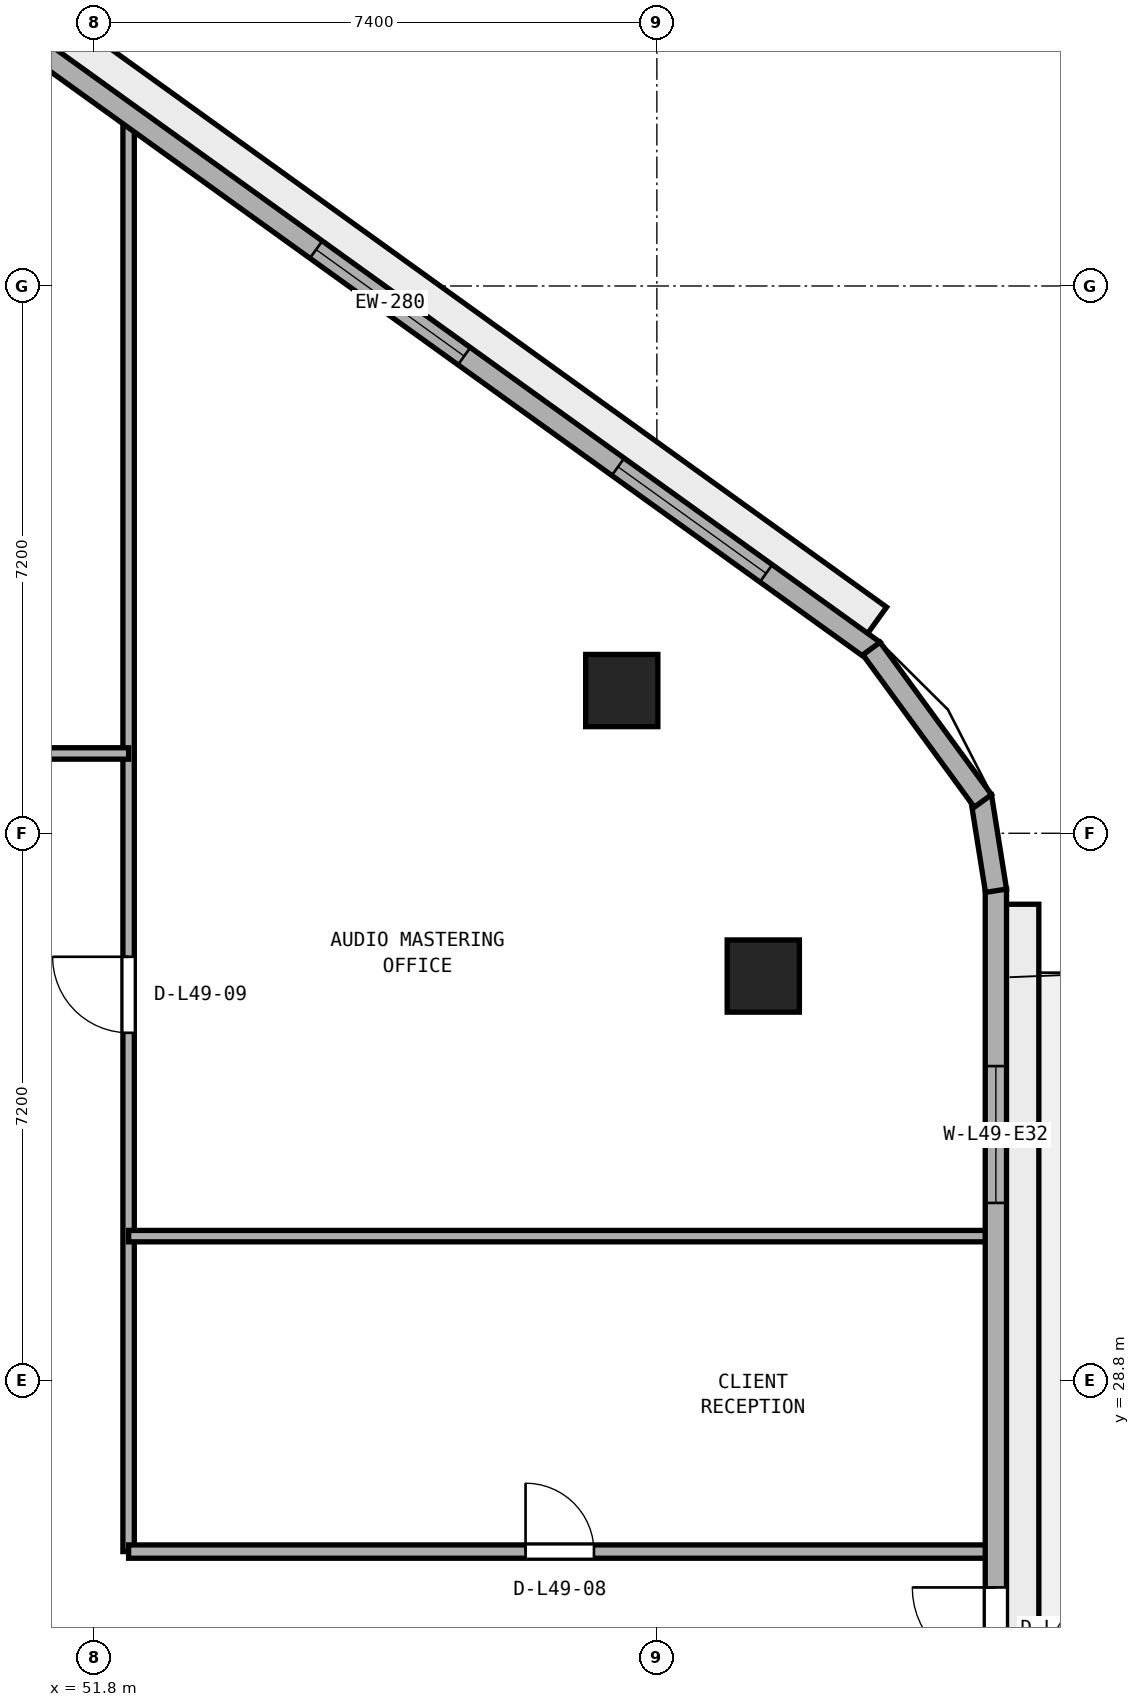
"""IFC4 building model, lengths in metres.
Left out: names, types, materials, properties, quantities, classifications, styles, units other than length and angle.
Written with IfcOpenShell. Run it as: python <this file> out.ifc"""

import sys

from ifc_helpers import new_model, si_unit, direction, frame, frame_2d, origin, origin_2d, place, context, subcontext, project, spatial, rectangle, extrude, element, fill, save


model = new_model("IFC4")
c1 = context("Model", 3, precision=1e-05, world=origin(), true_north=direction((0.0, 1.0)))
c2 = subcontext(c1, "Body", "Model", "MODEL_VIEW")
j1 = project(units=[si_unit("LENGTHUNIT", "METRE"), si_unit("PLANEANGLEUNIT", "RADIAN")], contexts=[c1])
p1 = place(None, origin())
s1 = spatial("IfcSite", under=j1, at=p1, CompositionType="ELEMENT")
p2 = place(p1, origin())
s2 = spatial("IfcBuilding", under=s1, at=p2, CompositionType="ELEMENT")
p3 = place(p2, frame((0.0, 0.0, 193.4)))
s3 = spatial("IfcBuildingStorey", under=s2, at=p3, CompositionType="ELEMENT", Elevation=193.4)
for number, where, z_axis, x_axis in (
    (1, (60.6, 34.122, 0.0), (0.0, 0.0, 1.0), (1.0, 0.0, 0.0)),
    (2, (58.738, 37.878, 0.0), (0.0, 0.0, 1.0), (1.0, 0.0, 0.0)),
):
    element("IfcColumn", number, at=place(p3, frame(where, z_axis=z_axis, x_axis=x_axis)), inside=s3, PredefinedType="COLUMN", context=c2, shape_type="SweptSolid", body=[
        extrude(rectangle(XDim=0.95, YDim=0.95, at=origin_2d()), origin(), (0.0, 0.0, 1.0), 3.8),
    ])
p4 = place(p3, frame((52.25, 26.55, 0.0), z_axis=(0.0, 0.0, 1.0), x_axis=(0.0, 1.0, 0.0)))
e3 = element("IfcWall", 3, at=p4, inside=s3, PredefinedType="PARTITIONING", context=c2, shape_type="SweptSolid", body=[
    extrude(rectangle(XDim=18.936, YDim=0.15, at=frame_2d((9.468, 0.0))), origin(), (0.0, 0.0, 1.0), 3.54),
])
p5 = place(p4, frame((6.825, 0.0, 0.0)))
e4 = element("IfcOpeningElement", 4, at=p5, cuts=e3, PredefinedType="OPENING", context=c2, shape_type="SweptSolid", body=[
    extrude(rectangle(XDim=1.0, YDim=2.12, at=frame_2d((0.5, 1.06))), frame((0.0, 0.085, 0.0), z_axis=(0.0, -1.0, 0.0), x_axis=(1.0, 0.0, 0.0)), (0.0, 0.0, 1.0), 0.17),
])
p6 = place(p3, frame((52.25, 26.55, 0.0), z_axis=(0.0, 0.0, 1.0), x_axis=(1.0, 0.0, 0.0)))
e5 = element("IfcWall", 5, at=p6, inside=s3, PredefinedType="PARTITIONING", context=c2, shape_type="SweptSolid", body=[
    extrude(rectangle(XDim=11.345, YDim=0.175, at=frame_2d((5.672, 0.0))), origin(), (0.0, 0.0, 1.0), 3.54),
])
p7 = place(p6, frame((5.222, 0.0, 0.0)))
e6 = element("IfcOpeningElement", 6, at=p7, cuts=e5, PredefinedType="OPENING", context=c2, shape_type="SweptSolid", body=[
    extrude(rectangle(XDim=0.9, YDim=2.1, at=frame_2d((0.45, 1.05))), frame((0.0, 0.097, 0.0), z_axis=(0.0, -1.0, 0.0), x_axis=(1.0, 0.0, 0.0)), (0.0, 0.0, 1.0), 0.195),
])
p8 = place(p3, frame((52.25, 30.7, 0.0), z_axis=(0.0, 0.0, 1.0), x_axis=(1.0, 0.0, 0.0)))
e7 = element("IfcWall", 7, at=p8, inside=s3, PredefinedType="PARTITIONING", context=c2, shape_type="SweptSolid", body=[
    extrude(rectangle(XDim=11.345, YDim=0.15, at=frame_2d((5.672, 0.0))), origin(), (0.0, 0.0, 1.0), 3.54),
])
p9 = place(p3, frame((21.75, 37.05, 0.0), z_axis=(0.0, 0.0, 1.0), x_axis=(1.0, 0.0, 0.0)))
e8 = element("IfcWall", 8, at=p9, inside=s3, PredefinedType="PARTITIONING", context=c2, shape_type="SweptSolid", body=[
    extrude(rectangle(XDim=30.5, YDim=0.15, at=frame_2d((15.25, 0.0))), origin(), (0.0, 0.0, 1.0), 3.54),
])
p10 = place(p9, frame((7.895, 0.0, 0.0)))
e9 = element("IfcOpeningElement", 9, at=p10, cuts=e8, PredefinedType="OPENING", context=c2, shape_type="SweptSolid", body=[
    extrude(rectangle(XDim=1.0, YDim=2.12, at=frame_2d((0.5, 1.06))), frame((0.0, 0.085, 0.0), z_axis=(0.0, -1.0, 0.0), x_axis=(1.0, 0.0, 0.0)), (0.0, 0.0, 1.0), 0.17),
])
p11 = place(p9, frame((22.905, 0.0, 0.0)))
e10 = element("IfcOpeningElement", 10, at=p11, cuts=e8, PredefinedType="OPENING", context=c2, shape_type="SweptSolid", body=[
    extrude(rectangle(XDim=1.0, YDim=2.12, at=frame_2d((0.5, 1.06))), frame((0.0, 0.085, 0.0), z_axis=(0.0, -1.0, 0.0), x_axis=(1.0, 0.0, 0.0)), (0.0, 0.0, 1.0), 0.17),
])
p12 = place(p3, frame((63.66, 16.39, 0.0), z_axis=(0.0, 0.0, 1.0), x_axis=(0.0, 1.0, 0.0)))
e11 = element("IfcWall", 11, at=p12, inside=s3, PredefinedType="STANDARD", context=c2, shape_type="SweptSolid", body=[
    extrude(rectangle(XDim=18.876, YDim=0.28, at=frame_2d((9.438, 0.0))), origin(), (0.0, 0.0, 1.0), 2.79),
])
p13 = place(p12, frame((8.588, 0.0, 0.0)))
e12 = element("IfcOpeningElement", 12, at=p13, cuts=e11, PredefinedType="OPENING", context=c2, shape_type="SweptSolid", body=[
    extrude(rectangle(XDim=1.1, YDim=2.2, at=frame_2d((0.55, 1.1))), frame((0.0, 0.15, 0.0), z_axis=(0.0, -1.0, 0.0), x_axis=(1.0, 0.0, 0.0)), (0.0, 0.0, 1.0), 0.3),
])
p14 = place(p12, frame((2.579, 0.0, 0.85)))
e13 = element("IfcOpeningElement", 13, at=p14, cuts=e11, PredefinedType="OPENING", context=c2, shape_type="SweptSolid", body=[
    extrude(rectangle(XDim=1.8, YDim=1.2, at=frame_2d((0.9, 0.6))), frame((0.0, 0.15, 0.0), z_axis=(0.0, -1.0, 0.0), x_axis=(1.0, 0.0, 0.0)), (0.0, 0.0, 1.0), 0.3),
])
p15 = place(p12, frame((14.747, 0.0, 0.85)))
e14 = element("IfcOpeningElement", 14, at=p15, cuts=e11, PredefinedType="OPENING", context=c2, shape_type="SweptSolid", body=[
    extrude(rectangle(XDim=1.8, YDim=1.2, at=frame_2d((0.9, 0.6))), frame((0.0, 0.15, 0.0), z_axis=(0.0, -1.0, 0.0), x_axis=(1.0, 0.0, 0.0)), (0.0, 0.0, 1.0), 0.3),
])
p16 = place(p3, frame((62.054, 38.399, 0.0), z_axis=(0.0, 0.0, 1.0), x_axis=(-0.81172124793, 0.584045045915, 0.0)))
e15 = element("IfcWall", 15, at=p16, inside=s3, PredefinedType="STANDARD", context=c2, shape_type="SweptSolid", body=[
    extrude(rectangle(XDim=15.679, YDim=0.28, at=frame_2d((7.84, 0.0))), origin(), (0.0, 0.0, 1.0), 3.54),
])
p17 = place(p16, frame((1.747, 0.0, 0.9)))
e16 = element("IfcOpeningElement", 16, at=p17, cuts=e15, PredefinedType="OPENING", context=c2, shape_type="SweptSolid", body=[
    extrude(rectangle(XDim=2.4, YDim=1.75, at=frame_2d((1.2, 0.875))), frame((0.0, 0.15, 0.0), z_axis=(0.0, -1.0, 0.0), x_axis=(1.0, 0.0, 0.0)), (0.0, 0.0, 1.0), 0.3),
])
p18 = place(p16, frame((6.64, 0.0, 0.9)))
e17 = element("IfcOpeningElement", 17, at=p18, cuts=e15, PredefinedType="OPENING", context=c2, shape_type="SweptSolid", body=[
    extrude(rectangle(XDim=2.4, YDim=1.75, at=frame_2d((1.2, 0.875))), frame((0.0, 0.15, 0.0), z_axis=(0.0, -1.0, 0.0), x_axis=(1.0, 0.0, 0.0)), (0.0, 0.0, 1.0), 0.3),
])
p19 = place(p3, frame((63.662, 35.244, 0.0), z_axis=(0.0, 0.0, 1.0), x_axis=(-0.157059104921, 0.987589204863, 0.0)))
e18 = element("IfcWall", 18, at=p19, inside=s3, PredefinedType="STANDARD", context=c2, shape_type="SweptSolid", body=[
    extrude(rectangle(XDim=1.258, YDim=0.28, at=frame_2d((0.629, 0.0))), origin(), (0.0, 0.0, 1.0), 3.54),
])
p20 = place(p3, frame((63.489, 36.426, 0.0), z_axis=(0.0, 0.0, 1.0), x_axis=(-0.590267940876, 0.80720738226, 0.0)))
e19 = element("IfcWall", 19, at=p20, inside=s3, PredefinedType="STANDARD", context=c2, shape_type="SweptSolid", body=[
    extrude(rectangle(XDim=2.484, YDim=0.28, at=frame_2d((1.242, 0.0))), origin(), (0.0, 0.0, 1.0), 3.54),
])
p21 = place(p7, origin())
e20 = element("IfcDoor", 20, at=p21, inside=s3, OperationType="SINGLE_SWING_LEFT", PredefinedType="DOOR", context=c2, shape_type="SweptSolid", body=[
    extrude(rectangle(XDim=0.9, YDim=2.1, at=frame_2d((0.45, 1.05))), frame((0.0, 0.025, 0.0), z_axis=(0.0, -1.0, 0.0), x_axis=(1.0, 0.0, 0.0)), (0.0, 0.0, 1.0), 0.05),
])
fill(e6, e20)
p22 = place(p5, origin())
e21 = element("IfcDoor", 21, at=p22, inside=s3, OperationType="SINGLE_SWING_RIGHT", PredefinedType="DOOR", context=c2, shape_type="SweptSolid", body=[
    extrude(rectangle(XDim=1.0, YDim=2.12, at=frame_2d((0.5, 1.06))), frame((0.0, 0.025, 0.0), z_axis=(0.0, -1.0, 0.0), x_axis=(1.0, 0.0, 0.0)), (0.0, 0.0, 1.0), 0.05),
])
fill(e4, e21)
p23 = place(p13, origin())
e22 = element("IfcDoor", 22, at=p23, inside=s3, OperationType="SINGLE_SWING_RIGHT", PredefinedType="DOOR", context=c2, shape_type="SweptSolid", body=[
    extrude(rectangle(XDim=1.1, YDim=2.2, at=frame_2d((0.55, 1.1))), frame((0.0, 0.025, 0.0), z_axis=(0.0, -1.0, 0.0), x_axis=(1.0, 0.0, 0.0)), (0.0, 0.0, 1.0), 0.05),
])
fill(e12, e22)
p24 = place(p15, origin())
e23 = element("IfcWindow", 23, at=p24, inside=s3, PartitioningType="SINGLE_PANEL", PredefinedType="WINDOW", context=c2, shape_type="SweptSolid", body=[
    extrude(rectangle(XDim=1.8, YDim=1.2, at=frame_2d((0.9, 0.6))), frame((0.0, 0.03, 0.0), z_axis=(0.0, -1.0, 0.0), x_axis=(1.0, 0.0, 0.0)), (0.0, 0.0, 1.0), 0.06),
])
fill(e14, e23)
p25 = place(p17, origin())
e24 = element("IfcWindow", 24, at=p25, inside=s3, PartitioningType="SINGLE_PANEL", PredefinedType="WINDOW", context=c2, shape_type="SweptSolid", body=[
    extrude(rectangle(XDim=2.4, YDim=1.75, at=frame_2d((1.2, 0.875))), frame((0.0, 0.03, 0.0), z_axis=(0.0, -1.0, 0.0), x_axis=(1.0, 0.0, 0.0)), (0.0, 0.0, 1.0), 0.06),
])
fill(e16, e24)
p26 = place(p18, origin())
e25 = element("IfcWindow", 25, at=p26, inside=s3, PartitioningType="SINGLE_PANEL", PredefinedType="WINDOW", context=c2, shape_type="SweptSolid", body=[
    extrude(rectangle(XDim=2.4, YDim=1.75, at=frame_2d((1.2, 0.875))), frame((0.0, 0.03, 0.0), z_axis=(0.0, -1.0, 0.0), x_axis=(1.0, 0.0, 0.0)), (0.0, 0.0, 1.0), 0.06),
])
fill(e17, e25)
save(model, sys.argv[1])
